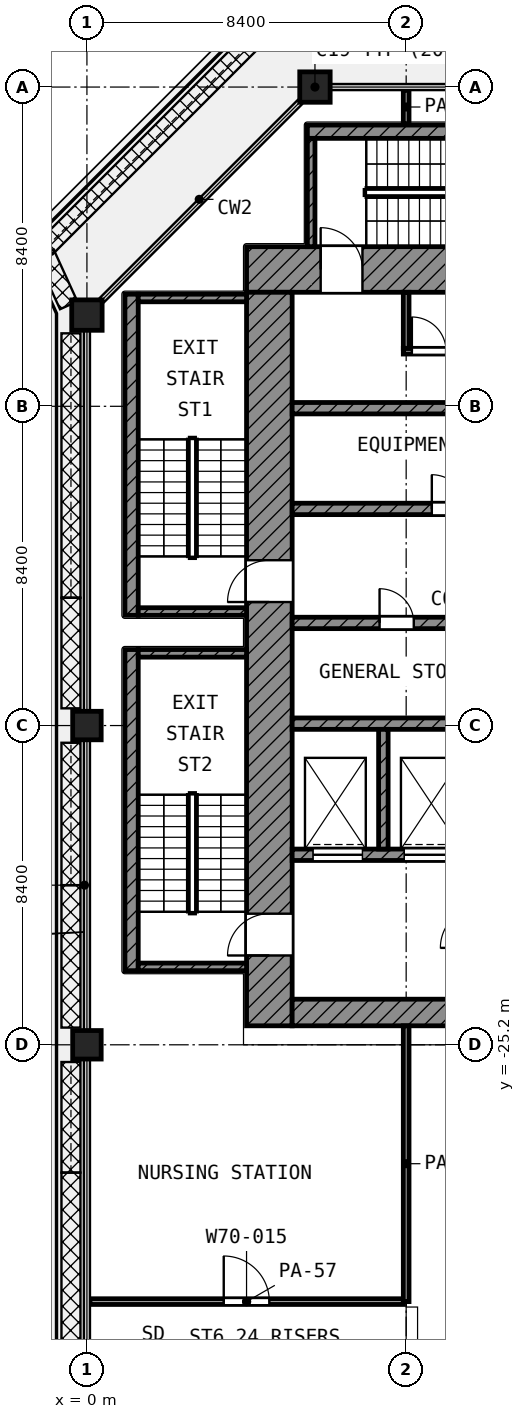
"""IFC4 building model, lengths in metres.
Left out: names, types, materials, properties, quantities, classifications, styles, units other than length and angle.
Written with IfcOpenShell. Run it as: python <this file> out.ifc"""

import sys

from ifc_helpers import new_model, si_unit, direction, frame, frame_2d, origin, origin_2d, place, context, subcontext, project, spatial, rectangle, extrude, element, fill, save


model = new_model("IFC4")
c1 = context("Model", 3, precision=1e-05, world=origin(), true_north=direction((0.0, 1.0)))
c2 = subcontext(c1, "Body", "Model", "MODEL_VIEW")
j1 = project(units=[si_unit("LENGTHUNIT", "METRE"), si_unit("PLANEANGLEUNIT", "RADIAN")], contexts=[c1])
p1 = place(None, origin())
s1 = spatial("IfcSite", under=j1, at=p1, CompositionType="ELEMENT")
p2 = place(p1, origin())
s2 = spatial("IfcBuilding", under=s1, at=p2, CompositionType="ELEMENT")
p3 = place(p2, frame((0.0, 0.0, 302.8)))
s3 = spatial("IfcBuildingStorey", under=s2, at=p3, CompositionType="ELEMENT", Elevation=302.8)
for number, where, z_axis, x_axis in (
    (1, (6.0, 0.0, 0.0), (0.0, 0.0, 1.0), (1.0, 0.0, 0.0)),
    (2, (0.0, -6.0, 0.0), (0.0, 0.0, 1.0), (1.0, 0.0, 0.0)),
):
    element("IfcColumn", number, at=place(p3, frame(where, z_axis=z_axis, x_axis=x_axis)), inside=s3, PredefinedType="COLUMN", context=c2, shape_type="SweptSolid", body=[
        extrude(rectangle(XDim=0.8, YDim=0.8, at=origin_2d()), origin(), (0.0, 0.0, 1.0), 4.2),
    ])
for number, where, z_axis, x_axis in (
    (3, (0.0, -16.8, 0.0), (0.0, 0.0, 1.0), (1.0, 0.0, 0.0)),
    (4, (0.0, -25.2, 0.0), (0.0, 0.0, 1.0), (1.0, 0.0, 0.0)),
):
    element("IfcColumn", number, at=place(p3, frame(where, z_axis=z_axis, x_axis=x_axis)), inside=s3, PredefinedType="COLUMN", context=c2, shape_type="SweptSolid", body=[
        extrude(rectangle(XDim=0.75, YDim=0.75, at=origin_2d()), origin(), (0.0, 0.0, 1.0), 4.2),
    ])
p4 = place(p3, frame((4.2, -4.8, 0.0), z_axis=(0.0, 0.0, 1.0), x_axis=(1.0, 0.0, 0.0)))
e5 = element("IfcWall", 5, at=p4, inside=s3, PredefinedType="SHEAR", context=c2, shape_type="SweptSolid", body=[
    extrude(rectangle(XDim=20.5, YDim=1.2, at=frame_2d((10.25, 0.0))), origin(), (0.0, 0.0, 1.0), 3.6),
])
p5 = place(p4, frame((1.95, 0.0, 0.0)))
e6 = element("IfcOpeningElement", 6, at=p5, cuts=e5, PredefinedType="OPENING", context=c2, shape_type="SweptSolid", body=[
    extrude(rectangle(XDim=1.1, YDim=2.1, at=frame_2d((0.55, 1.05))), frame((0.0, 0.61, 0.0), z_axis=(0.0, -1.0, 0.0), x_axis=(1.0, 0.0, 0.0)), (0.0, 0.0, 1.0), 1.22),
])
p6 = place(p4, frame((17.95, 0.0, 0.0)))
e7 = element("IfcOpeningElement", 7, at=p6, cuts=e5, PredefinedType="OPENING", context=c2, shape_type="SweptSolid", body=[
    extrude(rectangle(XDim=1.1, YDim=2.1, at=frame_2d((0.55, 1.05))), frame((0.0, 0.61, 0.0), z_axis=(0.0, -1.0, 0.0), x_axis=(1.0, 0.0, 0.0)), (0.0, 0.0, 1.0), 1.22),
])
p7 = place(p3, frame((4.8, -24.7, 0.0), z_axis=(0.0, 0.0, 1.0), x_axis=(0.0, 1.0, 0.0)))
e8 = element("IfcWall", 8, at=p7, inside=s3, PredefinedType="SHEAR", context=c2, shape_type="SweptSolid", body=[
    extrude(rectangle(XDim=19.3, YDim=1.2, at=frame_2d((9.65, 0.0))), origin(), (0.0, 0.0, 1.0), 3.6),
])
p8 = place(p7, frame((11.15, 0.0, 0.0)))
e9 = element("IfcOpeningElement", 9, at=p8, cuts=e8, PredefinedType="OPENING", context=c2, shape_type="SweptSolid", body=[
    extrude(rectangle(XDim=1.1, YDim=2.1, at=frame_2d((0.55, 1.05))), frame((0.0, 0.61, 0.0), z_axis=(0.0, -1.0, 0.0), x_axis=(1.0, 0.0, 0.0)), (0.0, 0.0, 1.0), 1.22),
])
p9 = place(p7, frame((1.85, 0.0, 0.0)))
e10 = element("IfcOpeningElement", 10, at=p9, cuts=e8, PredefinedType="OPENING", context=c2, shape_type="SweptSolid", body=[
    extrude(rectangle(XDim=1.1, YDim=2.1, at=frame_2d((0.55, 1.05))), frame((0.0, 0.61, 0.0), z_axis=(0.0, -1.0, 0.0), x_axis=(1.0, 0.0, 0.0)), (0.0, 0.0, 1.0), 1.22),
])
p10 = place(p3, frame((5.4, -24.35, 0.0), z_axis=(0.0, 0.0, 1.0), x_axis=(1.0, 0.0, 0.0)))
e11 = element("IfcWall", 11, at=p10, inside=s3, PredefinedType="SHEAR", context=c2, shape_type="SweptSolid", body=[
    extrude(rectangle(XDim=18.6, YDim=0.7, at=frame_2d((9.3, 0.0))), origin(), (0.0, 0.0, 1.0), 3.6),
])
p11 = place(p10, frame((6.3, 0.0, 0.0)))
e12 = element("IfcOpeningElement", 12, at=p11, cuts=e11, PredefinedType="OPENING", context=c2, shape_type="SweptSolid", body=[
    extrude(rectangle(XDim=1.8, YDim=2.1, at=frame_2d((0.9, 1.05))), frame((0.0, 0.36, 0.0), z_axis=(0.0, -1.0, 0.0), x_axis=(1.0, 0.0, 0.0)), (0.0, 0.0, 1.0), 0.72),
])
p12 = place(p3, frame((5.4, -8.45, 0.0), z_axis=(0.0, 0.0, 1.0), x_axis=(1.0, 0.0, 0.0)))
e13 = element("IfcWall", 13, at=p12, inside=s3, PredefinedType="SHEAR", context=c2, shape_type="SweptSolid", body=[
    extrude(rectangle(XDim=16.65, YDim=0.3, at=frame_2d((8.325, 0.0))), origin(), (0.0, 0.0, 1.0), 3.6),
])
p13 = place(p3, frame((5.4, -11.1, 0.0), z_axis=(0.0, 0.0, 1.0), x_axis=(1.0, 0.0, 0.0)))
e14 = element("IfcWall", 14, at=p13, inside=s3, PredefinedType="SHEAR", context=c2, shape_type="SweptSolid", body=[
    extrude(rectangle(XDim=16.65, YDim=0.3, at=frame_2d((8.325, 0.0))), origin(), (0.0, 0.0, 1.0), 3.6),
])
p14 = place(p13, frame((3.675, 0.0, 0.0)))
e15 = element("IfcOpeningElement", 15, at=p14, cuts=e14, PredefinedType="OPENING", context=c2, shape_type="SweptSolid", body=[
    extrude(rectangle(XDim=0.9, YDim=2.1, at=frame_2d((0.45, 1.05))), frame((0.0, 0.16, 0.0), z_axis=(0.0, -1.0, 0.0), x_axis=(1.0, 0.0, 0.0)), (0.0, 0.0, 1.0), 0.32),
])
p15 = place(p13, frame((11.925, 0.0, 0.0)))
e16 = element("IfcOpeningElement", 16, at=p15, cuts=e14, PredefinedType="OPENING", context=c2, shape_type="SweptSolid", body=[
    extrude(rectangle(XDim=0.9, YDim=2.1, at=frame_2d((0.45, 1.05))), frame((0.0, 0.16, 0.0), z_axis=(0.0, -1.0, 0.0), x_axis=(1.0, 0.0, 0.0)), (0.0, 0.0, 1.0), 0.32),
])
p16 = place(p3, frame((5.4, -14.1, 0.0), z_axis=(0.0, 0.0, 1.0), x_axis=(1.0, 0.0, 0.0)))
e17 = element("IfcWall", 17, at=p16, inside=s3, PredefinedType="SHEAR", context=c2, shape_type="SweptSolid", body=[
    extrude(rectangle(XDim=16.65, YDim=0.3, at=frame_2d((8.325, 0.0))), origin(), (0.0, 0.0, 1.0), 3.6),
])
p17 = place(p16, frame((6.325, 0.0, 0.0)))
e18 = element("IfcOpeningElement", 18, at=p17, cuts=e17, PredefinedType="OPENING", context=c2, shape_type="SweptSolid", body=[
    extrude(rectangle(XDim=1.1, YDim=2.1, at=frame_2d((0.55, 1.05))), frame((0.0, 0.16, 0.0), z_axis=(0.0, -1.0, 0.0), x_axis=(1.0, 0.0, 0.0)), (0.0, 0.0, 1.0), 0.32),
])
p18 = place(p16, frame((9.075, 0.0, 0.0)))
e19 = element("IfcOpeningElement", 19, at=p18, cuts=e17, PredefinedType="OPENING", context=c2, shape_type="SweptSolid", body=[
    extrude(rectangle(XDim=1.1, YDim=2.1, at=frame_2d((0.55, 1.05))), frame((0.0, 0.16, 0.0), z_axis=(0.0, -1.0, 0.0), x_axis=(1.0, 0.0, 0.0)), (0.0, 0.0, 1.0), 0.32),
])
p19 = place(p16, frame((11.825, 0.0, 0.0)))
e20 = element("IfcOpeningElement", 20, at=p19, cuts=e17, PredefinedType="OPENING", context=c2, shape_type="SweptSolid", body=[
    extrude(rectangle(XDim=1.1, YDim=2.1, at=frame_2d((0.55, 1.05))), frame((0.0, 0.16, 0.0), z_axis=(0.0, -1.0, 0.0), x_axis=(1.0, 0.0, 0.0)), (0.0, 0.0, 1.0), 0.32),
])
p20 = place(p16, frame((14.575, 0.0, 0.0)))
e21 = element("IfcOpeningElement", 21, at=p20, cuts=e17, PredefinedType="OPENING", context=c2, shape_type="SweptSolid", body=[
    extrude(rectangle(XDim=1.1, YDim=2.1, at=frame_2d((0.55, 1.05))), frame((0.0, 0.16, 0.0), z_axis=(0.0, -1.0, 0.0), x_axis=(1.0, 0.0, 0.0)), (0.0, 0.0, 1.0), 0.32),
])
p21 = place(p16, frame((2.3, 0.0, 0.0)))
e22 = element("IfcOpeningElement", 22, at=p21, cuts=e17, PredefinedType="OPENING", context=c2, shape_type="SweptSolid", body=[
    extrude(rectangle(XDim=0.9, YDim=2.1, at=frame_2d((0.45, 1.05))), frame((0.0, 0.16, 0.0), z_axis=(0.0, -1.0, 0.0), x_axis=(1.0, 0.0, 0.0)), (0.0, 0.0, 1.0), 0.32),
])
p22 = place(p3, frame((5.4, -16.75, 0.0), z_axis=(0.0, 0.0, 1.0), x_axis=(1.0, 0.0, 0.0)))
e23 = element("IfcWall", 23, at=p22, inside=s3, PredefinedType="SHEAR", context=c2, shape_type="SweptSolid", body=[
    extrude(rectangle(XDim=16.65, YDim=0.3, at=frame_2d((8.325, 0.0))), origin(), (0.0, 0.0, 1.0), 3.6),
])
p23 = place(p3, frame((5.4, -20.2, 0.0), z_axis=(0.0, 0.0, 1.0), x_axis=(1.0, 0.0, 0.0)))
e24 = element("IfcWall", 24, at=p23, inside=s3, PredefinedType="SHEAR", context=c2, shape_type="SweptSolid", body=[
    extrude(rectangle(XDim=14.65, YDim=0.3, at=frame_2d((7.325, 0.0))), origin(), (0.0, 0.0, 1.0), 3.6),
])
p24 = place(p23, frame((10.55, 0.0, 0.0)))
e25 = element("IfcOpeningElement", 25, at=p24, cuts=e24, PredefinedType="OPENING", context=c2, shape_type="SweptSolid", body=[
    extrude(rectangle(XDim=1.3, YDim=2.1, at=frame_2d((0.65, 1.05))), frame((0.0, 0.16, 0.0), z_axis=(0.0, -1.0, 0.0), x_axis=(1.0, 0.0, 0.0)), (0.0, 0.0, 1.0), 0.32),
])
p25 = place(p23, frame((12.95, 0.0, 0.0)))
e26 = element("IfcOpeningElement", 26, at=p25, cuts=e24, PredefinedType="OPENING", context=c2, shape_type="SweptSolid", body=[
    extrude(rectangle(XDim=1.3, YDim=2.1, at=frame_2d((0.65, 1.05))), frame((0.0, 0.16, 0.0), z_axis=(0.0, -1.0, 0.0), x_axis=(1.0, 0.0, 0.0)), (0.0, 0.0, 1.0), 0.32),
])
p26 = place(p23, frame((0.55, 0.0, 0.0)))
e27 = element("IfcOpeningElement", 27, at=p26, cuts=e24, PredefinedType="OPENING", context=c2, shape_type="SweptSolid", body=[
    extrude(rectangle(XDim=1.3, YDim=2.1, at=frame_2d((0.65, 1.05))), frame((0.0, 0.16, 0.0), z_axis=(0.0, -1.0, 0.0), x_axis=(1.0, 0.0, 0.0)), (0.0, 0.0, 1.0), 0.32),
])
p27 = place(p23, frame((2.95, 0.0, 0.0)))
e28 = element("IfcOpeningElement", 28, at=p27, cuts=e24, PredefinedType="OPENING", context=c2, shape_type="SweptSolid", body=[
    extrude(rectangle(XDim=1.3, YDim=2.1, at=frame_2d((0.65, 1.05))), frame((0.0, 0.16, 0.0), z_axis=(0.0, -1.0, 0.0), x_axis=(1.0, 0.0, 0.0)), (0.0, 0.0, 1.0), 0.32),
])
p28 = place(p23, frame((5.95, 0.0, 0.0)))
e29 = element("IfcOpeningElement", 29, at=p28, cuts=e24, PredefinedType="OPENING", context=c2, shape_type="SweptSolid", body=[
    extrude(rectangle(XDim=0.9, YDim=2.1, at=frame_2d((0.45, 1.05))), frame((0.0, 0.16, 0.0), z_axis=(0.0, -1.0, 0.0), x_axis=(1.0, 0.0, 0.0)), (0.0, 0.0, 1.0), 0.32),
])
p29 = place(p23, frame((8.35, 0.0, 0.0)))
e30 = element("IfcOpeningElement", 30, at=p29, cuts=e24, PredefinedType="OPENING", context=c2, shape_type="SweptSolid", body=[
    extrude(rectangle(XDim=0.9, YDim=2.1, at=frame_2d((0.45, 1.05))), frame((0.0, 0.16, 0.0), z_axis=(0.0, -1.0, 0.0), x_axis=(1.0, 0.0, 0.0)), (0.0, 0.0, 1.0), 0.32),
])
p30 = place(p3, frame((7.8, -20.05, 0.0), z_axis=(0.0, 0.0, 1.0), x_axis=(0.0, 1.0, 0.0)))
e31 = element("IfcWall", 31, at=p30, inside=s3, PredefinedType="SHEAR", context=c2, shape_type="SweptSolid", body=[
    extrude(rectangle(XDim=3.15, YDim=0.25, at=frame_2d((1.575, 0.0))), origin(), (0.0, 0.0, 1.0), 3.6),
])
p31 = place(p3, frame((8.325, -6.95, 0.0), z_axis=(0.0, 0.0, 1.0), x_axis=(1.0, 0.0, 0.0)))
e32 = element("IfcWall", 32, at=p31, inside=s3, PredefinedType="PARTITIONING", context=c2, shape_type="SweptSolid", body=[
    extrude(rectangle(XDim=12.75, YDim=0.15, at=frame_2d((6.375, 0.0))), origin(), (0.0, 0.0, 1.0), 3.6),
])
p32 = place(p31, frame((0.225, 0.0, 0.0)))
e33 = element("IfcOpeningElement", 33, at=p32, cuts=e32, PredefinedType="OPENING", context=c2, shape_type="SweptSolid", body=[
    extrude(rectangle(XDim=0.9, YDim=2.1, at=frame_2d((0.45, 1.05))), frame((0.0, 0.085, 0.0), z_axis=(0.0, -1.0, 0.0), x_axis=(1.0, 0.0, 0.0)), (0.0, 0.0, 1.0), 0.17),
])
p33 = place(p31, frame((2.025, 0.0, 0.0)))
e34 = element("IfcOpeningElement", 34, at=p33, cuts=e32, PredefinedType="OPENING", context=c2, shape_type="SweptSolid", body=[
    extrude(rectangle(XDim=0.9, YDim=2.1, at=frame_2d((0.45, 1.05))), frame((0.0, 0.085, 0.0), z_axis=(0.0, -1.0, 0.0), x_axis=(1.0, 0.0, 0.0)), (0.0, 0.0, 1.0), 0.17),
])
p34 = place(p31, frame((4.125, 0.0, 0.0)))
e35 = element("IfcOpeningElement", 35, at=p34, cuts=e32, PredefinedType="OPENING", context=c2, shape_type="SweptSolid", body=[
    extrude(rectangle(XDim=0.9, YDim=2.1, at=frame_2d((0.45, 1.05))), frame((0.0, 0.085, 0.0), z_axis=(0.0, -1.0, 0.0), x_axis=(1.0, 0.0, 0.0)), (0.0, 0.0, 1.0), 0.17),
])
p35 = place(p31, frame((5.625, 0.0, 0.0)))
e36 = element("IfcOpeningElement", 36, at=p35, cuts=e32, PredefinedType="OPENING", context=c2, shape_type="SweptSolid", body=[
    extrude(rectangle(XDim=0.9, YDim=2.1, at=frame_2d((0.45, 1.05))), frame((0.0, 0.085, 0.0), z_axis=(0.0, -1.0, 0.0), x_axis=(1.0, 0.0, 0.0)), (0.0, 0.0, 1.0), 0.17),
])
p36 = place(p31, frame((7.425, 0.0, 0.0)))
e37 = element("IfcOpeningElement", 37, at=p36, cuts=e32, PredefinedType="OPENING", context=c2, shape_type="SweptSolid", body=[
    extrude(rectangle(XDim=0.9, YDim=2.1, at=frame_2d((0.45, 1.05))), frame((0.0, 0.085, 0.0), z_axis=(0.0, -1.0, 0.0), x_axis=(1.0, 0.0, 0.0)), (0.0, 0.0, 1.0), 0.17),
])
p37 = place(p31, frame((9.225, 0.0, 0.0)))
e38 = element("IfcOpeningElement", 38, at=p37, cuts=e32, PredefinedType="OPENING", context=c2, shape_type="SweptSolid", body=[
    extrude(rectangle(XDim=0.9, YDim=2.1, at=frame_2d((0.45, 1.05))), frame((0.0, 0.085, 0.0), z_axis=(0.0, -1.0, 0.0), x_axis=(1.0, 0.0, 0.0)), (0.0, 0.0, 1.0), 0.17),
])
p38 = place(p31, frame((11.025, 0.0, 0.0)))
e39 = element("IfcOpeningElement", 39, at=p38, cuts=e32, PredefinedType="OPENING", context=c2, shape_type="SweptSolid", body=[
    extrude(rectangle(XDim=0.9, YDim=2.1, at=frame_2d((0.45, 1.05))), frame((0.0, 0.085, 0.0), z_axis=(0.0, -1.0, 0.0), x_axis=(1.0, 0.0, 0.0)), (0.0, 0.0, 1.0), 0.17),
])
p39 = place(p3, frame((8.4, -6.875, 0.0), z_axis=(0.0, 0.0, 1.0), x_axis=(0.0, 1.0, 0.0)))
e40 = element("IfcWall", 40, at=p39, inside=s3, PredefinedType="PARTITIONING", context=c2, shape_type="SweptSolid", body=[
    extrude(rectangle(XDim=1.475, YDim=0.15, at=frame_2d((0.738, 0.0))), origin(), (0.0, 0.0, 1.0), 3.6),
])
p40 = place(p3, frame((1.175, -13.9, 0.0), z_axis=(0.0, 0.0, 1.0), x_axis=(0.0, 1.0, 0.0)))
e41 = element("IfcWall", 41, at=p40, inside=s3, PredefinedType="SHEAR", context=c2, shape_type="SweptSolid", body=[
    extrude(rectangle(XDim=8.45, YDim=0.35, at=frame_2d((4.225, 0.0))), origin(), (0.0, 0.0, 1.0), 3.6),
])
for number, where, z_axis, x_axis in (
    (42, (1.35, -5.55, 0.0), (0.0, 0.0, 1.0), (1.0, 0.0, 0.0)),
    (43, (1.35, -13.8, 0.0), (0.0, 0.0, 1.0), (1.0, 0.0, 0.0)),
):
    element("IfcWall", number, at=place(p3, frame(where, z_axis=z_axis, x_axis=x_axis)), inside=s3, PredefinedType="SHEAR", context=c2, shape_type="SweptSolid", body=[
        extrude(rectangle(XDim=2.85, YDim=0.2, at=frame_2d((1.425, 0.0))), origin(), (0.0, 0.0, 1.0), 3.6),
    ])
p41 = place(p3, frame((1.175, -23.25, 0.0), z_axis=(0.0, 0.0, 1.0), x_axis=(0.0, 1.0, 0.0)))
e44 = element("IfcWall", 44, at=p41, inside=s3, PredefinedType="SHEAR", context=c2, shape_type="SweptSolid", body=[
    extrude(rectangle(XDim=8.45, YDim=0.35, at=frame_2d((4.225, 0.0))), origin(), (0.0, 0.0, 1.0), 3.6),
])
for number, where, z_axis, x_axis in (
    (45, (1.35, -14.9, 0.0), (0.0, 0.0, 1.0), (1.0, 0.0, 0.0)),
    (46, (1.35, -23.15, 0.0), (0.0, 0.0, 1.0), (1.0, 0.0, 0.0)),
):
    element("IfcWall", number, at=place(p3, frame(where, z_axis=z_axis, x_axis=x_axis)), inside=s3, PredefinedType="SHEAR", context=c2, shape_type="SweptSolid", body=[
        extrude(rectangle(XDim=2.85, YDim=0.2, at=frame_2d((1.425, 0.0))), origin(), (0.0, 0.0, 1.0), 3.6),
    ])
p42 = place(p3, frame((5.8, -1.175, 0.0), z_axis=(0.0, 0.0, 1.0), x_axis=(1.0, 0.0, 0.0)))
e47 = element("IfcWall", 47, at=p42, inside=s3, PredefinedType="SHEAR", context=c2, shape_type="SweptSolid", body=[
    extrude(rectangle(XDim=8.45, YDim=0.35, at=frame_2d((4.225, 0.0))), origin(), (0.0, 0.0, 1.0), 3.6),
])
p43 = place(p3, frame((5.9, -4.2, 0.0), z_axis=(0.0, 0.0, 1.0), x_axis=(0.0, 1.0, 0.0)))
e48 = element("IfcWall", 48, at=p43, inside=s3, PredefinedType="SHEAR", context=c2, shape_type="SweptSolid", body=[
    extrude(rectangle(XDim=2.85, YDim=0.2, at=frame_2d((1.425, 0.0))), origin(), (0.0, 0.0, 1.0), 3.6),
])
p44 = place(p3, frame((0.08, -31.957, 0.0), z_axis=(0.0, 0.0, 1.0), x_axis=(1.0, 0.0, 0.0)))
e49 = element("IfcWall", 49, at=p44, inside=s3, PredefinedType="PARTITIONING", context=c2, shape_type="SweptSolid", body=[
    extrude(rectangle(XDim=8.245, YDim=0.15, at=frame_2d((4.123, 0.0))), origin(), (0.0, 0.0, 1.0), 2.7),
])
p45 = place(p44, frame((3.52, 0.0, 0.0)))
e50 = element("IfcOpeningElement", 50, at=p45, cuts=e49, PredefinedType="OPENING", context=c2, shape_type="SweptSolid", body=[
    extrude(rectangle(XDim=1.2, YDim=2.1, at=frame_2d((0.6, 1.05))), frame((0.0, 0.085, 0.0), z_axis=(0.0, -1.0, 0.0), x_axis=(1.0, 0.0, 0.0)), (0.0, 0.0, 1.0), 0.17),
])
p46 = place(p3, frame((8.4, -31.957, 0.0), z_axis=(0.0, 0.0, 1.0), x_axis=(0.0, 1.0, 0.0)))
e51 = element("IfcWall", 51, at=p46, inside=s3, PredefinedType="PARTITIONING", context=c2, shape_type="SweptSolid", body=[
    extrude(rectangle(XDim=7.257, YDim=0.15, at=frame_2d((3.628, 0.0))), origin(), (0.0, 0.0, 1.0), 3.6),
])
p47 = place(p3, frame((8.4, -0.97, 0.0), z_axis=(0.0, 0.0, 1.0), x_axis=(0.0, 1.0, 0.0)))
e52 = element("IfcWall", 52, at=p47, inside=s3, PredefinedType="PARTITIONING", context=c2, shape_type="SweptSolid", body=[
    extrude(rectangle(XDim=0.89, YDim=0.15, at=frame_2d((0.445, 0.0))), origin(), (0.0, 0.0, 1.0), 3.6),
])
p48 = place(p26, origin())
e53 = element("IfcDoor", 53, at=p48, inside=s3, OperationType="DOUBLE_DOOR_SLIDING", PredefinedType="DOOR", context=c2, shape_type="SweptSolid", body=[
    extrude(rectangle(XDim=1.3, YDim=2.1, at=frame_2d((0.65, 1.05))), frame((0.0, 0.025, 0.0), z_axis=(0.0, -1.0, 0.0), x_axis=(1.0, 0.0, 0.0)), (0.0, 0.0, 1.0), 0.05),
])
fill(e27, e53)
p49 = place(p27, origin())
e54 = element("IfcDoor", 54, at=p49, inside=s3, OperationType="DOUBLE_DOOR_SLIDING", PredefinedType="DOOR", context=c2, shape_type="SweptSolid", body=[
    extrude(rectangle(XDim=1.3, YDim=2.1, at=frame_2d((0.65, 1.05))), frame((0.0, 0.025, 0.0), z_axis=(0.0, -1.0, 0.0), x_axis=(1.0, 0.0, 0.0)), (0.0, 0.0, 1.0), 0.05),
])
fill(e28, e54)
p50 = place(p8, origin())
e55 = element("IfcDoor", 55, at=p50, inside=s3, OperationType="SINGLE_SWING_LEFT", PredefinedType="DOOR", context=c2, shape_type="SweptSolid", body=[
    extrude(rectangle(XDim=1.1, YDim=2.1, at=frame_2d((0.55, 1.05))), frame((0.0, 0.025, 0.0), z_axis=(0.0, -1.0, 0.0), x_axis=(1.0, 0.0, 0.0)), (0.0, 0.0, 1.0), 0.05),
])
fill(e9, e55)
p51 = place(p9, origin())
e56 = element("IfcDoor", 56, at=p51, inside=s3, OperationType="SINGLE_SWING_LEFT", PredefinedType="DOOR", context=c2, shape_type="SweptSolid", body=[
    extrude(rectangle(XDim=1.1, YDim=2.1, at=frame_2d((0.55, 1.05))), frame((0.0, 0.025, 0.0), z_axis=(0.0, -1.0, 0.0), x_axis=(1.0, 0.0, 0.0)), (0.0, 0.0, 1.0), 0.05),
])
fill(e10, e56)
p52 = place(p5, origin())
e57 = element("IfcDoor", 57, at=p52, inside=s3, OperationType="SINGLE_SWING_LEFT", PredefinedType="DOOR", context=c2, shape_type="SweptSolid", body=[
    extrude(rectangle(XDim=1.1, YDim=2.1, at=frame_2d((0.55, 1.05))), frame((0.0, 0.025, 0.0), z_axis=(0.0, -1.0, 0.0), x_axis=(1.0, 0.0, 0.0)), (0.0, 0.0, 1.0), 0.05),
])
fill(e6, e57)
p53 = place(p32, origin())
e58 = element("IfcDoor", 58, at=p53, inside=s3, OperationType="SINGLE_SWING_LEFT", PredefinedType="DOOR", context=c2, shape_type="SweptSolid", body=[
    extrude(rectangle(XDim=0.9, YDim=2.1, at=frame_2d((0.45, 1.05))), frame((0.0, 0.025, 0.0), z_axis=(0.0, -1.0, 0.0), x_axis=(1.0, 0.0, 0.0)), (0.0, 0.0, 1.0), 0.05),
])
fill(e33, e58)
p54 = place(p14, origin())
e59 = element("IfcDoor", 59, at=p54, inside=s3, OperationType="SINGLE_SWING_LEFT", PredefinedType="DOOR", context=c2, shape_type="SweptSolid", body=[
    extrude(rectangle(XDim=0.9, YDim=2.1, at=frame_2d((0.45, 1.05))), frame((0.0, 0.025, 0.0), z_axis=(0.0, -1.0, 0.0), x_axis=(1.0, 0.0, 0.0)), (0.0, 0.0, 1.0), 0.05),
])
fill(e15, e59)
p55 = place(p21, origin())
e60 = element("IfcDoor", 60, at=p55, inside=s3, OperationType="SINGLE_SWING_LEFT", PredefinedType="DOOR", context=c2, shape_type="SweptSolid", body=[
    extrude(rectangle(XDim=0.9, YDim=2.1, at=frame_2d((0.45, 1.05))), frame((0.0, 0.025, 0.0), z_axis=(0.0, -1.0, 0.0), x_axis=(1.0, 0.0, 0.0)), (0.0, 0.0, 1.0), 0.05),
])
fill(e22, e60)
p56 = place(p45, origin())
e61 = element("IfcDoor", 61, at=p56, inside=s3, OperationType="SINGLE_SWING_LEFT", PredefinedType="DOOR", context=c2, shape_type="SweptSolid", body=[
    extrude(rectangle(XDim=1.2, YDim=2.1, at=frame_2d((0.6, 1.05))), frame((0.0, 0.025, 0.0), z_axis=(0.0, -1.0, 0.0), x_axis=(1.0, 0.0, 0.0)), (0.0, 0.0, 1.0), 0.05),
])
fill(e50, e61)
save(model, sys.argv[1])
